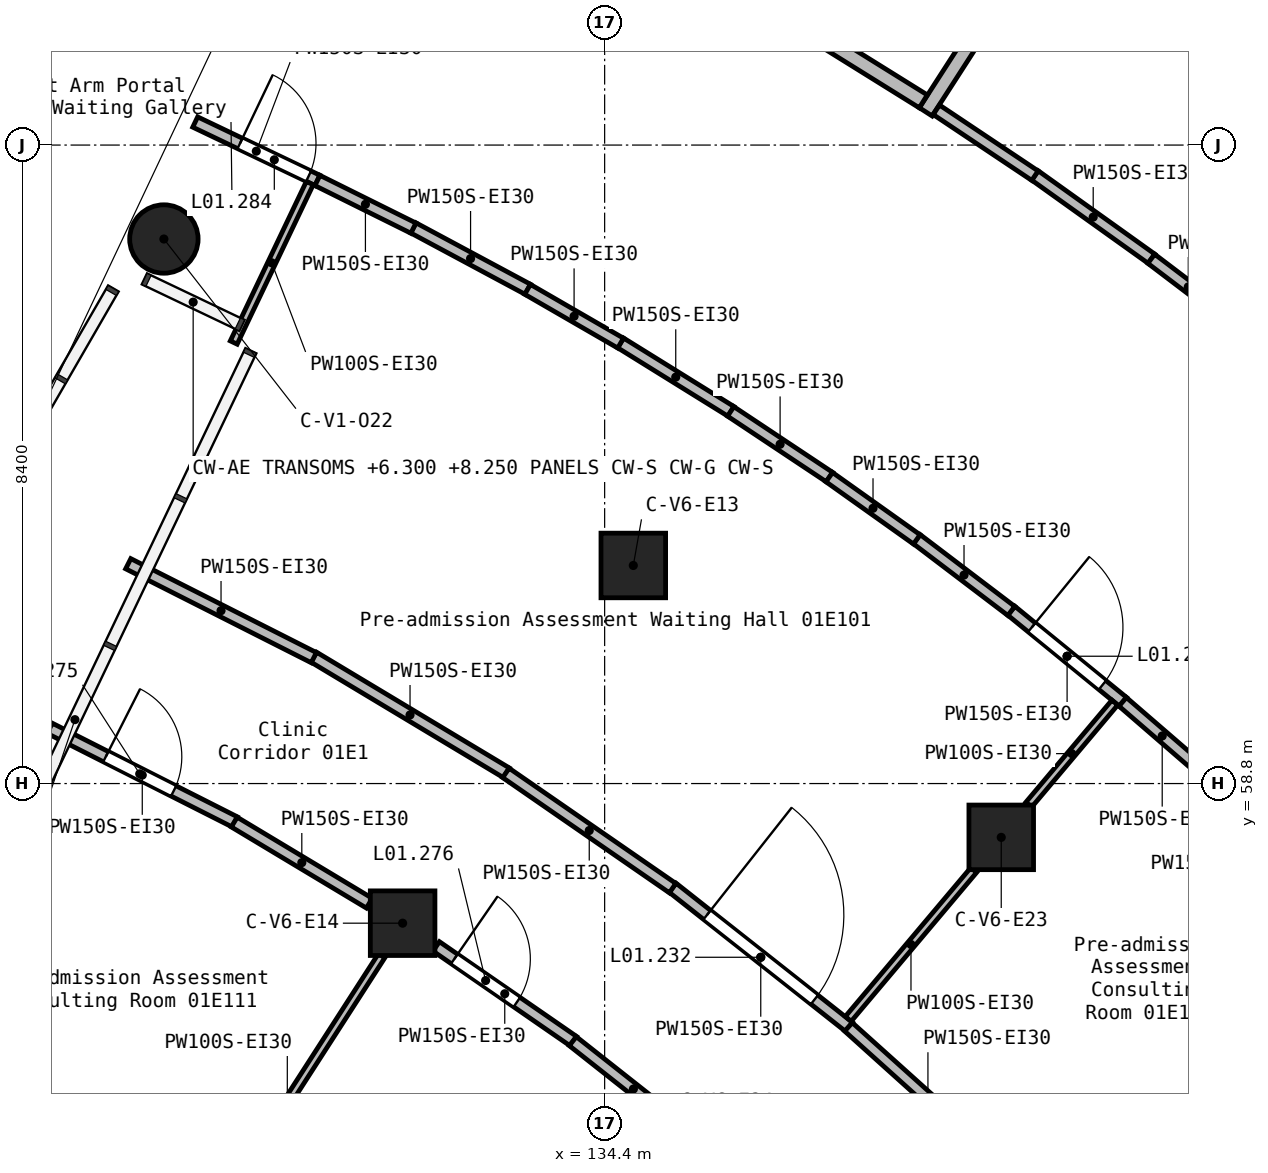
"""IFC4 building model, lengths in metres.
Left out: names, types, materials, properties, quantities, classifications, styles, units other than length and angle.
Written with IfcOpenShell. Run it as: python <this file> out.ifc"""

import sys

from ifc_helpers import new_model, si_unit, direction, frame, frame_2d, origin, origin_2d, place, context, subcontext, project, spatial, rectangle, circle, extrude, element, fill, save


model = new_model("IFC4")
c1 = context("Model", 3, precision=1e-05, world=origin(), true_north=direction((0.0, 1.0)))
c2 = subcontext(c1, "Body", "Model", "MODEL_VIEW")
j1 = project(units=[si_unit("LENGTHUNIT", "METRE"), si_unit("PLANEANGLEUNIT", "RADIAN")], contexts=[c1])
p1 = place(None, origin())
s1 = spatial("IfcSite", under=j1, at=p1, CompositionType="ELEMENT")
p2 = place(p1, origin())
s2 = spatial("IfcBuilding", under=s1, at=p2, CompositionType="ELEMENT")
p3 = place(p2, frame((0.0, 0.0, 5.4)))
s3 = spatial("IfcBuildingStorey", under=s2, at=p3, CompositionType="ELEMENT", Elevation=5.4)
p4 = place(p3, frame((128.601, 65.964, 0.0), z_axis=(0.0, 0.0, 1.0), x_axis=(1.0, 0.0, 0.0)))
e1 = element("IfcColumn", 1, at=p4, inside=s3, PredefinedType="COLUMN", context=c2, shape_type="SweptSolid", body=[
    extrude(circle(Radius=0.45, at=origin_2d()), origin(), (0.0, 0.0, 1.0), 4.5),
])
for number, where, z_axis, x_axis in (
    (2, (131.742, 56.963, 0.0), (0.0, 0.0, 1.0), (1.0, 0.0, 0.0)),
    (3, (134.777, 61.669, 0.0), (0.0, 0.0, 1.0), (1.0, 0.0, 0.0)),
    (4, (139.618, 58.092, 0.0), (0.0, 0.0, 1.0), (1.0, 0.0, 0.0)),
):
    element("IfcColumn", number, at=place(p3, frame(where, z_axis=z_axis, x_axis=x_axis)), inside=s3, PredefinedType="COLUMN", context=c2, shape_type="SweptSolid", body=[
        extrude(rectangle(XDim=0.85, YDim=0.85, at=origin_2d()), origin(), (0.0, 0.0, 1.0), 4.5),
    ])
p5 = place(p3, frame((138.625, 67.637, 0.0), z_axis=(0.0, 0.0, 1.0), x_axis=(0.541789312023, 0.840514331453, 0.0)))
e5 = element("IfcWall", 5, at=p5, inside=s3, PredefinedType="SOLIDWALL", context=c2, shape_type="SweptSolid", body=[
    extrude(rectangle(XDim=1.961, YDim=0.2, at=frame_2d((0.98, 0.0))), origin(), (0.0, 0.0, 1.0), 4.15),
])
p6 = place(p3, frame((137.12, 68.691, 0.0), z_axis=(0.0, 0.0, 1.0), x_axis=(0.849072037542, -0.528277081714, 0.0)))
e6 = element("IfcWall", 6, at=p6, inside=s3, PredefinedType="SOLIDWALL", context=c2, shape_type="SweptSolid", body=[
    extrude(rectangle(XDim=1.734, YDim=0.2, at=frame_2d((0.867, 0.0))), origin(), (0.0, 0.0, 1.0), 4.15),
])
p7 = place(p3, frame((126.055, 67.081, 0.0), z_axis=(0.0, 0.0, 1.0), x_axis=(0.259011275585, 0.965874297784, 0.0)))
e7 = element("IfcWall", 7, at=p7, inside=s3, PredefinedType="PARTITIONING", context=c2, shape_type="SweptSolid", body=[
    extrude(rectangle(XDim=4.641, YDim=0.15, at=frame_2d((2.321, 0.0))), origin(), (0.0, 0.0, 1.0), 4.15),
])
p8 = place(p3, frame((135.293, 57.43, 0.0), z_axis=(0.0, 0.0, 1.0), x_axis=(0.785039104315, -0.619446208073, 0.0)))
e8 = element("IfcWall", 8, at=p8, inside=s3, PredefinedType="PARTITIONING", context=c2, shape_type="SweptSolid", body=[
    extrude(rectangle(XDim=2.958, YDim=0.15, at=frame_2d((1.479, 0.0))), origin(), (0.0, 0.0, 1.0), 4.15),
])
p9 = place(p8, frame((0.579, 0.0, 0.0)))
e9 = element("IfcOpeningElement", 9, at=p9, cuts=e8, PredefinedType="OPENING", context=c2, shape_type="SweptSolid", body=[
    extrude(rectangle(XDim=1.8, YDim=2.1, at=frame_2d((0.9, 1.05))), frame((0.0, 0.085, 0.0), z_axis=(0.0, -1.0, 0.0), x_axis=(1.0, 0.0, 0.0)), (0.0, 0.0, 1.0), 0.17),
])
p10 = place(p3, frame((130.572, 60.464, 0.0), z_axis=(0.0, 0.0, 1.0), x_axis=(0.857369075188, -0.514702116676, 0.0)))
e10 = element("IfcWall", 10, at=p10, inside=s3, PredefinedType="PARTITIONING", context=c2, shape_type="SweptSolid", body=[
    extrude(rectangle(XDim=2.958, YDim=0.15, at=frame_2d((1.479, 0.0))), origin(), (0.0, 0.0, 1.0), 4.15),
])
p11 = place(p3, frame((137.608, 55.598, 0.0), z_axis=(0.0, 0.0, 1.0), x_axis=(0.743501368773, -0.668734412628, 0.0)))
e11 = element("IfcWall", 11, at=p11, inside=s3, PredefinedType="PARTITIONING", context=c2, shape_type="SweptSolid", body=[
    extrude(rectangle(XDim=2.812, YDim=0.15, at=frame_2d((1.406, 0.0))), origin(), (0.0, 0.0, 1.0), 4.15),
])
p12 = place(p3, frame((133.101, 58.94, 0.0), z_axis=(0.0, 0.0, 1.0), x_axis=(0.822620530797, -0.568590768754, 0.0)))
e12 = element("IfcWall", 12, at=p12, inside=s3, PredefinedType="PARTITIONING", context=c2, shape_type="SweptSolid", body=[
    extrude(rectangle(XDim=2.666, YDim=0.15, at=frame_2d((1.333, 0.0))), origin(), (0.0, 0.0, 1.0), 4.15),
])
p13 = place(p3, frame((128.132, 61.692, 0.0), z_axis=(0.0, 0.0, 1.0), x_axis=(0.892275475515, -0.45149139061, 0.0)))
e13 = element("IfcWall", 13, at=p13, inside=s3, PredefinedType="PARTITIONING", context=c2, shape_type="SweptSolid", body=[
    extrude(rectangle(XDim=2.736, YDim=0.15, at=frame_2d((1.368, 0.0))), origin(), (0.0, 0.0, 1.0), 4.15),
])
p14 = place(p3, frame((132.184, 56.658, 0.0), z_axis=(0.0, 0.0, 1.0), x_axis=(0.82273696549, -0.568422277551, 0.0)))
e14 = element("IfcWall", 14, at=p14, inside=s3, PredefinedType="PARTITIONING", context=c2, shape_type="SweptSolid", body=[
    extrude(rectangle(XDim=2.193, YDim=0.15, at=frame_2d((1.096, 0.0))), origin(), (0.0, 0.0, 1.0), 4.15),
])
p15 = place(p14, frame((0.29, 0.0, 0.0)))
e15 = element("IfcOpeningElement", 15, at=p15, cuts=e14, PredefinedType="OPENING", context=c2, shape_type="SweptSolid", body=[
    extrude(rectangle(XDim=1.0, YDim=2.1, at=frame_2d((0.5, 1.05))), frame((0.0, 0.085, 0.0), z_axis=(0.0, -1.0, 0.0), x_axis=(1.0, 0.0, 0.0)), (0.0, 0.0, 1.0), 0.17),
])
p16 = place(p3, frame((127.099, 59.527, 0.0), z_axis=(0.0, 0.0, 1.0), x_axis=(0.892287657908, -0.451467313928, 0.0)))
e16 = element("IfcWall", 16, at=p16, inside=s3, PredefinedType="PARTITIONING", context=c2, shape_type="SweptSolid", body=[
    extrude(rectangle(XDim=2.729, YDim=0.15, at=frame_2d((1.364, 0.0))), origin(), (0.0, 0.0, 1.0), 4.15),
])
p17 = place(p16, frame((0.827, 0.0, 0.0)))
e17 = element("IfcOpeningElement", 17, at=p17, cuts=e16, PredefinedType="OPENING", context=c2, shape_type="SweptSolid", body=[
    extrude(rectangle(XDim=1.0, YDim=2.1, at=frame_2d((0.5, 1.05))), frame((0.0, 0.085, 0.0), z_axis=(0.0, -1.0, 0.0), x_axis=(1.0, 0.0, 0.0)), (0.0, 0.0, 1.0), 0.17),
])
p18 = place(p3, frame((133.981, 55.41, 0.0), z_axis=(0.0, 0.0, 1.0), x_axis=(0.784968928218, -0.619535133574, 0.0)))
e18 = element("IfcWall", 18, at=p18, inside=s3, PredefinedType="PARTITIONING", context=c2, shape_type="SweptSolid", body=[
    extrude(rectangle(XDim=2.031, YDim=0.15, at=frame_2d((1.015, 0.0))), origin(), (0.0, 0.0, 1.0), 4.15),
])
p19 = place(p3, frame((129.527, 58.293, 0.0), z_axis=(0.0, 0.0, 1.0), x_axis=(0.8573370195, -0.514755509922, 0.0)))
e19 = element("IfcWall", 19, at=p19, inside=s3, PredefinedType="PARTITIONING", context=c2, shape_type="SweptSolid", body=[
    extrude(rectangle(XDim=2.073, YDim=0.15, at=frame_2d((1.037, 0.0))), origin(), (0.0, 0.0, 1.0), 4.15),
])
p20 = place(p3, frame((139.75, 61.074, 0.0), z_axis=(0.0, 0.0, 1.0), x_axis=(0.774713973469, -0.63231183708, 0.0)))
e20 = element("IfcWall", 20, at=p20, inside=s3, PredefinedType="PARTITIONING", context=c2, shape_type="SweptSolid", body=[
    extrude(rectangle(XDim=1.896, YDim=0.15, at=frame_2d((0.948, 0.0))), origin(), (0.0, 0.0, 1.0), 4.15),
])
p21 = place(p20, frame((0.348, 0.0, 0.0)))
e21 = element("IfcOpeningElement", 21, at=p21, cuts=e20, PredefinedType="OPENING", context=c2, shape_type="SweptSolid", body=[
    extrude(rectangle(XDim=1.2, YDim=2.1, at=frame_2d((0.6, 1.05))), frame((0.0, 0.085, 0.0), z_axis=(0.0, -1.0, 0.0), x_axis=(1.0, 0.0, 0.0)), (0.0, 0.0, 1.0), 0.17),
])
p22 = place(p3, frame((140.061, 66.801, 0.0), z_axis=(0.0, 0.0, 1.0), x_axis=(0.81360220793, -0.581421918448, 0.0)))
e22 = element("IfcWall", 22, at=p22, inside=s3, PredefinedType="PARTITIONING", context=c2, shape_type="SweptSolid", body=[
    extrude(rectangle(XDim=1.885, YDim=0.15, at=frame_2d((0.943, 0.0))), origin(), (0.0, 0.0, 1.0), 4.15),
])
p23 = place(p3, frame((138.764, 67.664, 0.0), z_axis=(0.0, 0.0, 1.0), x_axis=(0.831520299658, -0.555494366539, 0.0)))
e23 = element("IfcWall", 23, at=p23, inside=s3, PredefinedType="PARTITIONING", context=c2, shape_type="SweptSolid", body=[
    extrude(rectangle(XDim=1.56, YDim=0.15, at=frame_2d((0.78, 0.0))), origin(), (0.0, 0.0, 1.0), 4.15),
])
p24 = place(p3, frame((129.013, 67.503, 0.0), z_axis=(0.0, 0.0, 1.0), x_axis=(0.902472562088, -0.430747344365, 0.0)))
e24 = element("IfcWall", 24, at=p24, inside=s3, PredefinedType="PARTITIONING", context=c2, shape_type="SweptSolid", body=[
    extrude(rectangle(XDim=1.781, YDim=0.15, at=frame_2d((0.891, 0.0))), origin(), (0.0, 0.0, 1.0), 4.15),
])
p25 = place(p24, frame((0.653, 0.0, 0.0)))
e25 = element("IfcOpeningElement", 25, at=p25, cuts=e24, PredefinedType="OPENING", context=c2, shape_type="SweptSolid", body=[
    extrude(rectangle(XDim=1.0, YDim=2.1, at=frame_2d((0.5, 1.05))), frame((0.0, 0.085, 0.0), z_axis=(0.0, -1.0, 0.0), x_axis=(1.0, 0.0, 0.0)), (0.0, 0.0, 1.0), 0.17),
])
p26 = place(p3, frame((138.506, 62.015, 0.0), z_axis=(0.0, 0.0, 1.0), x_axis=(0.7964030968, -0.604766159278, 0.0)))
e26 = element("IfcWall", 26, at=p26, inside=s3, PredefinedType="PARTITIONING", context=c2, shape_type="SweptSolid", body=[
    extrude(rectangle(XDim=1.562, YDim=0.15, at=frame_2d((0.781, 0.0))), origin(), (0.0, 0.0, 1.0), 4.15),
])
p27 = place(p3, frame((134.609, 64.597, 0.0), z_axis=(0.0, 0.0, 1.0), x_axis=(0.849799037667, -0.527106816102, 0.0)))
e27 = element("IfcWall", 27, at=p27, inside=s3, PredefinedType="PARTITIONING", context=c2, shape_type="SweptSolid", body=[
    extrude(rectangle(XDim=1.709, YDim=0.15, at=frame_2d((0.854, 0.0))), origin(), (0.0, 0.0, 1.0), 4.15),
])
p28 = place(p3, frame((131.883, 66.111, 0.0), z_axis=(0.0, 0.0, 1.0), x_axis=(0.881203803206, -0.472736562174, 0.0)))
e28 = element("IfcWall", 28, at=p28, inside=s3, PredefinedType="PARTITIONING", context=c2, shape_type="SweptSolid", body=[
    extrude(rectangle(XDim=1.709, YDim=0.15, at=frame_2d((0.855, 0.0))), origin(), (0.0, 0.0, 1.0), 4.15),
])
p29 = place(p3, frame((133.386, 65.302, 0.0), z_axis=(0.0, 0.0, 1.0), x_axis=(0.865938212252, -0.500150989765, 0.0)))
e29 = element("IfcWall", 29, at=p29, inside=s3, PredefinedType="PARTITIONING", context=c2, shape_type="SweptSolid", body=[
    extrude(rectangle(XDim=1.414, YDim=0.15, at=frame_2d((0.707, 0.0))), origin(), (0.0, 0.0, 1.0), 4.15),
])
p30 = place(p3, frame((136.059, 63.696, 0.0), z_axis=(0.0, 0.0, 1.0), x_axis=(0.832723443957, -0.553689141925, 0.0)))
e30 = element("IfcWall", 30, at=p30, inside=s3, PredefinedType="PARTITIONING", context=c2, shape_type="SweptSolid", body=[
    extrude(rectangle(XDim=1.561, YDim=0.15, at=frame_2d((0.78, 0.0))), origin(), (0.0, 0.0, 1.0), 4.15),
])
p31 = place(p3, frame((130.621, 66.734, 0.0), z_axis=(0.0, 0.0, 1.0), x_axis=(0.895739562296, -0.444579167907, 0.0)))
e31 = element("IfcWall", 31, at=p31, inside=s3, PredefinedType="PARTITIONING", context=c2, shape_type="SweptSolid", body=[
    extrude(rectangle(XDim=1.41, YDim=0.15, at=frame_2d((0.705, 0.0))), origin(), (0.0, 0.0, 1.0), 4.15),
])
p32 = place(p3, frame((137.355, 62.831, 0.0), z_axis=(0.0, 0.0, 1.0), x_axis=(0.815004293048, -0.579454918276, 0.0)))
e32 = element("IfcWall", 32, at=p32, inside=s3, PredefinedType="PARTITIONING", context=c2, shape_type="SweptSolid", body=[
    extrude(rectangle(XDim=1.413, YDim=0.15, at=frame_2d((0.706, 0.0))), origin(), (0.0, 0.0, 1.0), 4.15),
])
p33 = place(p3, frame((141.216, 59.875, 0.0), z_axis=(0.0, 0.0, 1.0), x_axis=(0.7566031668, -0.653874336542, 0.0)))
e33 = element("IfcWall", 33, at=p33, inside=s3, PredefinedType="PARTITIONING", context=c2, shape_type="SweptSolid", body=[
    extrude(rectangle(XDim=1.374, YDim=0.15, at=frame_2d((0.687, 0.0))), origin(), (0.0, 0.0, 1.0), 4.15),
])
p34 = place(p3, frame((141.592, 65.704, 0.0), z_axis=(0.0, 0.0, 1.0), x_axis=(0.79670453549, -0.604368995837, 0.0)))
e34 = element("IfcWall", 34, at=p34, inside=s3, PredefinedType="PARTITIONING", context=c2, shape_type="SweptSolid", body=[
    extrude(rectangle(XDim=1.222, YDim=0.15, at=frame_2d((0.611, 0.0))), origin(), (0.0, 0.0, 1.0), 4.15),
])
p35 = place(p3, frame((128.983, 52.683, 0.0), z_axis=(0.0, 0.0, 1.0), x_axis=(0.541806664818, 0.840503145716, 0.0)))
e35 = element("IfcWall", 35, at=p35, inside=s3, PredefinedType="PARTITIONING", context=c2, shape_type="SweptSolid", body=[
    extrude(rectangle(XDim=4.585, YDim=0.1, at=frame_2d((2.293, 0.0))), origin(), (0.0, 0.0, 1.0), 4.15),
])
p36 = place(p3, frame((137.605, 55.704, 0.0), z_axis=(0.0, 0.0, 1.0), x_axis=(0.644432238292, 0.764661421971, 0.0)))
e36 = element("IfcWall", 36, at=p36, inside=s3, PredefinedType="PARTITIONING", context=c2, shape_type="SweptSolid", body=[
    extrude(rectangle(XDim=2.561, YDim=0.1, at=frame_2d((1.28, 0.0))), origin(), (0.0, 0.0, 1.0), 4.15),
])
p37 = place(p3, frame((139.98, 58.522, 0.0), z_axis=(0.0, 0.0, 1.0), x_axis=(0.644495278204, 0.7646082895, 0.0)))
e37 = element("IfcWall", 37, at=p37, inside=s3, PredefinedType="PARTITIONING", context=c2, shape_type="SweptSolid", body=[
    extrude(rectangle(XDim=1.756, YDim=0.1, at=frame_2d((0.878, 0.0))), origin(), (0.0, 0.0, 1.0), 4.15),
])
p38 = place(p3, frame((129.52, 64.602, 0.0), z_axis=(0.0, 0.0, 1.0), x_axis=(0.430496224864, 0.902592377753, 0.0)))
e38 = element("IfcWall", 38, at=p38, inside=s3, PredefinedType="PARTITIONING", context=c2, shape_type="SweptSolid", body=[
    extrude(rectangle(XDim=2.324, YDim=0.1, at=frame_2d((1.162, 0.0))), origin(), (0.0, 0.0, 1.0), 4.15),
])
p39 = place(p9, frame((1.8, 0.0, 0.0), z_axis=(0.0, 0.0, 1.0), x_axis=(-1.0, 0.0, 0.0)))
e39 = element("IfcDoor", 39, at=p39, inside=s3, OperationType="DOUBLE_DOOR_SINGLE_SWING", PredefinedType="DOOR", context=c2, shape_type="SweptSolid", body=[
    extrude(rectangle(XDim=1.8, YDim=2.1, at=frame_2d((0.9, 1.05))), frame((0.0, 0.025, 0.0), z_axis=(0.0, -1.0, 0.0), x_axis=(1.0, 0.0, 0.0)), (0.0, 0.0, 1.0), 0.05),
])
fill(e9, e39)
p40 = place(p21, origin())
e40 = element("IfcDoor", 40, at=p40, inside=s3, OperationType="SINGLE_SWING_RIGHT", PredefinedType="DOOR", context=c2, shape_type="SweptSolid", body=[
    extrude(rectangle(XDim=1.2, YDim=2.1, at=frame_2d((0.6, 1.05))), frame((0.0, 0.025, 0.0), z_axis=(0.0, -1.0, 0.0), x_axis=(1.0, 0.0, 0.0)), (0.0, 0.0, 1.0), 0.05),
])
fill(e21, e40)
p41 = place(p17, frame((1.0, 0.0, 0.0), z_axis=(0.0, 0.0, 1.0), x_axis=(-1.0, 0.0, 0.0)))
e41 = element("IfcDoor", 41, at=p41, inside=s3, OperationType="SINGLE_SWING_RIGHT", PredefinedType="DOOR", context=c2, shape_type="SweptSolid", body=[
    extrude(rectangle(XDim=1.0, YDim=2.1, at=frame_2d((0.5, 1.05))), frame((0.0, 0.025, 0.0), z_axis=(0.0, -1.0, 0.0), x_axis=(1.0, 0.0, 0.0)), (0.0, 0.0, 1.0), 0.05),
])
fill(e17, e41)
p42 = place(p15, frame((1.0, 0.0, 0.0), z_axis=(0.0, 0.0, 1.0), x_axis=(-1.0, 0.0, 0.0)))
e42 = element("IfcDoor", 42, at=p42, inside=s3, OperationType="SINGLE_SWING_RIGHT", PredefinedType="DOOR", context=c2, shape_type="SweptSolid", body=[
    extrude(rectangle(XDim=1.0, YDim=2.1, at=frame_2d((0.5, 1.05))), frame((0.0, 0.025, 0.0), z_axis=(0.0, -1.0, 0.0), x_axis=(1.0, 0.0, 0.0)), (0.0, 0.0, 1.0), 0.05),
])
fill(e15, e42)
p43 = place(p25, frame((1.0, 0.0, 0.0), z_axis=(0.0, 0.0, 1.0), x_axis=(-1.0, 0.0, 0.0)))
e43 = element("IfcDoor", 43, at=p43, inside=s3, OperationType="SINGLE_SWING_LEFT", PredefinedType="DOOR", context=c2, shape_type="SweptSolid", body=[
    extrude(rectangle(XDim=1.0, YDim=2.1, at=frame_2d((0.5, 1.05))), frame((0.0, 0.025, 0.0), z_axis=(0.0, -1.0, 0.0), x_axis=(1.0, 0.0, 0.0)), (0.0, 0.0, 1.0), 0.05),
])
fill(e25, e43)
save(model, sys.argv[1])
